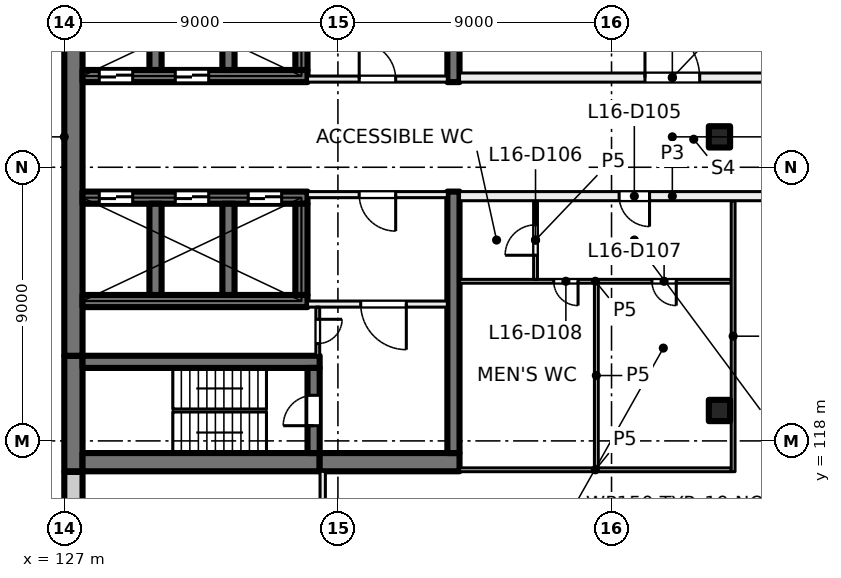
"""IFC4 building model, lengths in metres.
Left out: names, types, materials, properties, quantities, classifications, styles, units other than length and angle.
Written with IfcOpenShell. Run it as: python <this file> out.ifc"""

import sys

from ifc_helpers import new_model, si_unit, direction, frame, frame_2d, origin, origin_2d, place, context, subcontext, project, spatial, rectangle, extrude, element, fill, save


model = new_model("IFC4")
c1 = context("Model", 3, precision=1e-05, world=origin(), true_north=direction((0.0, 1.0)))
c2 = subcontext(c1, "Body", "Model", "MODEL_VIEW")
j1 = project(units=[si_unit("LENGTHUNIT", "METRE"), si_unit("PLANEANGLEUNIT", "RADIAN")], contexts=[c1])
p1 = place(None, origin())
s1 = spatial("IfcSite", under=j1, at=p1, CompositionType="ELEMENT")
p2 = place(p1, origin())
s2 = spatial("IfcBuilding", under=s1, at=p2, CompositionType="ELEMENT")
p3 = place(p2, frame((0.0, 0.0, 71.5)))
s3 = spatial("IfcBuildingStorey", under=s2, at=p3, CompositionType="ELEMENT", Elevation=71.5)
for number, where, z_axis, x_axis in (
    (1, (148.55, 119.0, 0.0), (0.0, 0.0, 1.0), (1.0, 0.0, 0.0)),
    (2, (148.55, 128.0, 0.0), (0.0, 0.0, 1.0), (1.0, 0.0, 0.0)),
):
    element("IfcColumn", number, at=place(p3, frame(where, z_axis=z_axis, x_axis=x_axis)), inside=s3, PredefinedType="COLUMN", context=c2, shape_type="SweptSolid", body=[
        extrude(rectangle(XDim=0.7, YDim=0.7, at=origin_2d()), origin(), (0.0, 0.0, 1.0), 4.0),
    ])
p4 = place(p3, frame((127.3, 117.0, 0.0), z_axis=(0.0, 0.0, 1.0), x_axis=(0.0, 1.0, 0.0)))
e3 = element("IfcWall", 3, at=p4, inside=s3, PredefinedType="SHEAR", context=c2, shape_type="SweptSolid", body=[
    extrude(rectangle(XDim=3.8, YDim=0.6, at=frame_2d((1.9, 0.0))), origin(), (0.0, 0.0, 1.0), 4.0),
])
p5 = place(p3, frame((127.3, 120.8, 0.0), z_axis=(0.0, 0.0, 1.0), x_axis=(0.0, 1.0, 0.0)))
e4 = element("IfcWall", 4, at=p5, inside=s3, PredefinedType="SHEAR", context=c2, shape_type="SweptSolid", body=[
    extrude(rectangle(XDim=14.4, YDim=0.6, at=frame_2d((7.2, 0.0))), origin(), (0.0, 0.0, 1.0), 4.0),
])
p6 = place(p3, frame((127.6, 117.3, 0.0), z_axis=(0.0, 0.0, 1.0), x_axis=(1.0, 0.0, 0.0)))
e5 = element("IfcWall", 5, at=p6, inside=s3, PredefinedType="SHEAR", context=c2, shape_type="SweptSolid", body=[
    extrude(rectangle(XDim=7.8, YDim=0.6, at=frame_2d((3.9, 0.0))), origin(), (0.0, 0.0, 1.0), 4.0),
])
p7 = place(p3, frame((135.4, 117.3, 0.0), z_axis=(0.0, 0.0, 1.0), x_axis=(1.0, 0.0, 0.0)))
e6 = element("IfcWall", 6, at=p7, inside=s3, PredefinedType="SHEAR", context=c2, shape_type="SweptSolid", body=[
    extrude(rectangle(XDim=4.6, YDim=0.6, at=frame_2d((2.3, 0.0))), origin(), (0.0, 0.0, 1.0), 4.0),
])
p8 = place(p3, frame((127.6, 120.6, 0.0), z_axis=(0.0, 0.0, 1.0), x_axis=(1.0, 0.0, 0.0)))
e7 = element("IfcWall", 7, at=p8, inside=s3, PredefinedType="SHEAR", context=c2, shape_type="SweptSolid", body=[
    extrude(rectangle(XDim=7.8, YDim=0.4, at=frame_2d((3.9, 0.0))), origin(), (0.0, 0.0, 1.0), 4.0),
])
p9 = place(p3, frame((135.2, 117.6, 0.0), z_axis=(0.0, 0.0, 1.0), x_axis=(0.0, 1.0, 0.0)))
e8 = element("IfcWall", 8, at=p9, inside=s3, PredefinedType="SHEAR", context=c2, shape_type="SweptSolid", body=[
    extrude(rectangle(XDim=2.8, YDim=0.4, at=frame_2d((1.4, 0.0))), origin(), (0.0, 0.0, 1.0), 4.0),
])
p10 = place(p9, frame((0.9, 0.0, 0.0)))
e9 = element("IfcOpeningElement", 9, at=p10, cuts=e8, PredefinedType="OPENING", context=c2, shape_type="SweptSolid", body=[
    extrude(rectangle(XDim=1.0, YDim=2.1, at=frame_2d((0.5, 1.05))), frame((0.0, 0.21, 0.0), z_axis=(0.0, -1.0, 0.0), x_axis=(1.0, 0.0, 0.0)), (0.0, 0.0, 1.0), 0.42),
])
p11 = place(p3, frame((127.6, 126.0, 0.0), z_axis=(0.0, 0.0, 1.0), x_axis=(1.0, 0.0, 0.0)))
e10 = element("IfcWall", 10, at=p11, inside=s3, PredefinedType="SHEAR", context=c2, shape_type="SweptSolid", body=[
    extrude(rectangle(XDim=7.4, YDim=0.4, at=frame_2d((3.7, 0.0))), origin(), (0.0, 0.0, 1.0), 4.0),
])
p12 = place(p11, frame((0.55, 0.0, 0.0)))
e11 = element("IfcOpeningElement", 11, at=p12, cuts=e10, PredefinedType="OPENING", context=c2, shape_type="SweptSolid", body=[
    extrude(rectangle(XDim=1.1, YDim=2.1, at=frame_2d((0.55, 1.05))), frame((0.0, 0.21, 0.0), z_axis=(0.0, -1.0, 0.0), x_axis=(1.0, 0.0, 0.0)), (0.0, 0.0, 1.0), 0.42),
])
p13 = place(p11, frame((3.05, 0.0, 0.0)))
e12 = element("IfcOpeningElement", 12, at=p13, cuts=e10, PredefinedType="OPENING", context=c2, shape_type="SweptSolid", body=[
    extrude(rectangle(XDim=1.1, YDim=2.1, at=frame_2d((0.55, 1.05))), frame((0.0, 0.21, 0.0), z_axis=(0.0, -1.0, 0.0), x_axis=(1.0, 0.0, 0.0)), (0.0, 0.0, 1.0), 0.42),
])
p14 = place(p11, frame((5.45, 0.0, 0.0)))
e13 = element("IfcOpeningElement", 13, at=p14, cuts=e10, PredefinedType="OPENING", context=c2, shape_type="SweptSolid", body=[
    extrude(rectangle(XDim=1.1, YDim=2.1, at=frame_2d((0.55, 1.05))), frame((0.0, 0.21, 0.0), z_axis=(0.0, -1.0, 0.0), x_axis=(1.0, 0.0, 0.0)), (0.0, 0.0, 1.0), 0.42),
])
p15 = place(p3, frame((127.6, 122.6, 0.0), z_axis=(0.0, 0.0, 1.0), x_axis=(1.0, 0.0, 0.0)))
e14 = element("IfcWall", 14, at=p15, inside=s3, PredefinedType="SHEAR", context=c2, shape_type="SweptSolid", body=[
    extrude(rectangle(XDim=7.4, YDim=0.4, at=frame_2d((3.7, 0.0))), origin(), (0.0, 0.0, 1.0), 4.0),
])
for number, where, z_axis, x_axis in (
    (15, (130.0, 122.8, 0.0), (0.0, 0.0, 1.0), (0.0, 1.0, 0.0)),
    (16, (132.4, 122.8, 0.0), (0.0, 0.0, 1.0), (0.0, 1.0, 0.0)),
    (17, (134.8, 122.8, 0.0), (0.0, 0.0, 1.0), (0.0, 1.0, 0.0)),
):
    element("IfcWall", number, at=place(p3, frame(where, z_axis=z_axis, x_axis=x_axis)), inside=s3, PredefinedType="SHEAR", context=c2, shape_type="SweptSolid", body=[
        extrude(rectangle(XDim=3.0, YDim=0.4, at=frame_2d((1.5, 0.0))), origin(), (0.0, 0.0, 1.0), 4.0),
    ])
p16 = place(p3, frame((127.6, 130.0, 0.0), z_axis=(0.0, 0.0, 1.0), x_axis=(1.0, 0.0, 0.0)))
e18 = element("IfcWall", 18, at=p16, inside=s3, PredefinedType="SHEAR", context=c2, shape_type="SweptSolid", body=[
    extrude(rectangle(XDim=7.4, YDim=0.4, at=frame_2d((3.7, 0.0))), origin(), (0.0, 0.0, 1.0), 4.0),
])
p17 = place(p16, frame((0.55, 0.0, 0.0)))
e19 = element("IfcOpeningElement", 19, at=p17, cuts=e18, PredefinedType="OPENING", context=c2, shape_type="SweptSolid", body=[
    extrude(rectangle(XDim=1.1, YDim=2.1, at=frame_2d((0.55, 1.05))), frame((0.0, 0.21, 0.0), z_axis=(0.0, -1.0, 0.0), x_axis=(1.0, 0.0, 0.0)), (0.0, 0.0, 1.0), 0.42),
])
p18 = place(p16, frame((3.05, 0.0, 0.0)))
e20 = element("IfcOpeningElement", 20, at=p18, cuts=e18, PredefinedType="OPENING", context=c2, shape_type="SweptSolid", body=[
    extrude(rectangle(XDim=1.1, YDim=2.1, at=frame_2d((0.55, 1.05))), frame((0.0, 0.21, 0.0), z_axis=(0.0, -1.0, 0.0), x_axis=(1.0, 0.0, 0.0)), (0.0, 0.0, 1.0), 0.42),
])
for number, where, z_axis, x_axis in (
    (21, (130.0, 130.2, 0.0), (0.0, 0.0, 1.0), (0.0, 1.0, 0.0)),
    (22, (132.4, 130.2, 0.0), (0.0, 0.0, 1.0), (0.0, 1.0, 0.0)),
):
    element("IfcWall", number, at=place(p3, frame(where, z_axis=z_axis, x_axis=x_axis)), inside=s3, PredefinedType="SHEAR", context=c2, shape_type="SweptSolid", body=[
        extrude(rectangle(XDim=3.0, YDim=0.4, at=frame_2d((1.5, 0.0))), origin(), (0.0, 0.0, 1.0), 4.0),
    ])
p19 = place(p3, frame((134.8, 130.2, 0.0), z_axis=(0.0, 0.0, 1.0), x_axis=(0.0, 1.0, 0.0)))
e23 = element("IfcWall", 23, at=p19, inside=s3, PredefinedType="SHEAR", context=c2, shape_type="SweptSolid", body=[
    extrude(rectangle(XDim=3.0, YDim=0.4, at=frame_2d((1.5, 0.0))), origin(), (0.0, 0.0, 1.0), 4.0),
])
p20 = place(p19, frame((0.95, 0.0, 0.0)))
e24 = element("IfcOpeningElement", 24, at=p20, cuts=e23, PredefinedType="OPENING", context=c2, shape_type="SweptSolid", body=[
    extrude(rectangle(XDim=1.1, YDim=2.1, at=frame_2d((0.55, 1.05))), frame((0.0, 0.21, 0.0), z_axis=(0.0, -1.0, 0.0), x_axis=(1.0, 0.0, 0.0)), (0.0, 0.0, 1.0), 0.42),
])
for number, where, z_axis, x_axis in (
    (25, (139.8, 117.6, 0.0), (0.0, 0.0, 1.0), (0.0, 1.0, 0.0)),
    (26, (139.8, 129.8, 0.0), (0.0, 0.0, 1.0), (0.0, 1.0, 0.0)),
):
    element("IfcWall", number, at=place(p3, frame(where, z_axis=z_axis, x_axis=x_axis)), inside=s3, PredefinedType="SHEAR", context=c2, shape_type="SweptSolid", body=[
        extrude(rectangle(XDim=8.6, YDim=0.4, at=frame_2d((4.3, 0.0))), origin(), (0.0, 0.0, 1.0), 4.0),
    ])
p21 = place(p3, frame((127.3, 114.07, 0.0), z_axis=(0.0, 0.0, 1.0), x_axis=(0.0, 1.0, 0.0)))
e27 = element("IfcWall", 27, at=p21, inside=s3, PredefinedType="SOLIDWALL", context=c2, shape_type="SweptSolid", body=[
    extrude(rectangle(XDim=2.91, YDim=0.6, at=frame_2d((1.455, 0.0))), origin(), (0.0, 0.0, 1.0), 3.625),
])
p22 = place(p3, frame((135.0, 129.9, 0.0), z_axis=(0.0, 0.0, 1.0), x_axis=(1.0, 0.0, 0.0)))
e28 = element("IfcWall", 28, at=p22, inside=s3, PredefinedType="PARTITIONING", context=c2, shape_type="SweptSolid", body=[
    extrude(rectangle(XDim=4.6, YDim=0.2, at=frame_2d((2.3, 0.0))), origin(), (0.0, 0.0, 1.0), 3.625),
])
p23 = place(p22, frame((1.7, 0.0, 0.0)))
e29 = element("IfcOpeningElement", 29, at=p23, cuts=e28, PredefinedType="OPENING", context=c2, shape_type="SweptSolid", body=[
    extrude(rectangle(XDim=1.2, YDim=2.1, at=frame_2d((0.6, 1.05))), frame((0.0, 0.11, 0.0), z_axis=(0.0, -1.0, 0.0), x_axis=(1.0, 0.0, 0.0)), (0.0, 0.0, 1.0), 0.22),
])
p24 = place(p3, frame((139.6, 126.1, 0.0), z_axis=(0.0, 0.0, 1.0), x_axis=(-1.0, 0.0, 0.0)))
e30 = element("IfcWall", 30, at=p24, inside=s3, PredefinedType="PARTITIONING", context=c2, shape_type="SweptSolid", body=[
    extrude(rectangle(XDim=4.6, YDim=0.2, at=frame_2d((2.3, 0.0))), origin(), (0.0, 0.0, 1.0), 3.625),
])
p25 = place(p24, frame((1.7, 0.0, 0.0)))
e31 = element("IfcOpeningElement", 31, at=p25, cuts=e30, PredefinedType="OPENING", context=c2, shape_type="SweptSolid", body=[
    extrude(rectangle(XDim=1.2, YDim=2.1, at=frame_2d((0.6, 1.05))), frame((0.0, 0.11, 0.0), z_axis=(0.0, -1.0, 0.0), x_axis=(1.0, 0.0, 0.0)), (0.0, 0.0, 1.0), 0.22),
])
p26 = place(p3, frame((139.6, 122.5, 0.0), z_axis=(0.0, 0.0, 1.0), x_axis=(-1.0, 0.0, 0.0)))
e32 = element("IfcWall", 32, at=p26, inside=s3, PredefinedType="PARTITIONING", context=c2, shape_type="SweptSolid", body=[
    extrude(rectangle(XDim=4.6, YDim=0.2, at=frame_2d((2.3, 0.0))), origin(), (0.0, 0.0, 1.0), 3.625),
])
p27 = place(p26, frame((1.35, 0.0, 0.0)))
e33 = element("IfcOpeningElement", 33, at=p27, cuts=e32, PredefinedType="OPENING", context=c2, shape_type="SweptSolid", body=[
    extrude(rectangle(XDim=1.5, YDim=2.1, at=frame_2d((0.75, 1.05))), frame((0.0, 0.11, 0.0), z_axis=(0.0, -1.0, 0.0), x_axis=(1.0, 0.0, 0.0)), (0.0, 0.0, 1.0), 0.22),
])
p28 = place(p3, frame((135.337, 122.4, 0.0), z_axis=(0.0, 0.0, 1.0), x_axis=(0.0, -1.0, 0.0)))
e34 = element("IfcWall", 34, at=p28, inside=s3, PredefinedType="PARTITIONING", context=c2, shape_type="SweptSolid", body=[
    extrude(rectangle(XDim=1.6, YDim=0.125, at=frame_2d((0.8, 0.0))), origin(), (0.0, 0.0, 1.0), 3.625),
])
p29 = place(p28, frame((0.4, 0.0, 0.0)))
e35 = element("IfcOpeningElement", 35, at=p29, cuts=e34, PredefinedType="OPENING", context=c2, shape_type="SweptSolid", body=[
    extrude(rectangle(XDim=0.8, YDim=2.1, at=frame_2d((0.4, 1.05))), frame((0.0, 0.073, 0.0), z_axis=(0.0, -1.0, 0.0), x_axis=(1.0, 0.0, 0.0)), (0.0, 0.0, 1.0), 0.145),
])
p30 = place(p3, frame((135.5, 117.0, 0.0), z_axis=(0.0, 0.0, 1.0), x_axis=(0.0, -1.0, 0.0)))
e36 = element("IfcWall", 36, at=p30, inside=s3, PredefinedType="PARTITIONING", context=c2, shape_type="SweptSolid", body=[
    extrude(rectangle(XDim=6.4, YDim=0.175, at=frame_2d((3.2, 0.0))), origin(), (0.0, 0.0, 1.0), 3.625),
])
p31 = place(p30, frame((2.6, 0.0, 0.0)))
e37 = element("IfcOpeningElement", 37, at=p31, cuts=e36, PredefinedType="OPENING", context=c2, shape_type="SweptSolid", body=[
    extrude(rectangle(XDim=1.2, YDim=2.1, at=frame_2d((0.6, 1.05))), frame((0.0, 0.097, 0.0), z_axis=(0.0, -1.0, 0.0), x_axis=(1.0, 0.0, 0.0)), (0.0, 0.0, 1.0), 0.195),
])
p32 = place(p3, frame((140.0, 117.05, 0.0), z_axis=(0.0, 0.0, 1.0), x_axis=(1.0, 0.0, 0.0)))
e38 = element("IfcWall", 38, at=p32, inside=s3, PredefinedType="PARTITIONING", context=c2, shape_type="SweptSolid", body=[
    extrude(rectangle(XDim=8.938, YDim=0.125, at=frame_2d((4.469, 0.0))), origin(), (0.0, 0.0, 1.0), 3.625),
])
p33 = place(p3, frame((148.938, 123.25, 0.0), z_axis=(0.0, 0.0, 1.0), x_axis=(-1.0, 0.0, 0.0)))
e39 = element("IfcWall", 39, at=p33, inside=s3, PredefinedType="PARTITIONING", context=c2, shape_type="SweptSolid", body=[
    extrude(rectangle(XDim=8.938, YDim=0.125, at=frame_2d((4.469, 0.0))), origin(), (0.0, 0.0, 1.0), 3.625),
])
p34 = place(p33, frame((1.809, 0.0, 0.0)))
e40 = element("IfcOpeningElement", 40, at=p34, cuts=e39, PredefinedType="OPENING", context=c2, shape_type="SweptSolid", body=[
    extrude(rectangle(XDim=0.8, YDim=2.1, at=frame_2d((0.4, 1.05))), frame((0.0, 0.073, 0.0), z_axis=(0.0, -1.0, 0.0), x_axis=(1.0, 0.0, 0.0)), (0.0, 0.0, 1.0), 0.145),
])
p35 = place(p33, frame((5.04, 0.0, 0.0)))
e41 = element("IfcOpeningElement", 41, at=p35, cuts=e39, PredefinedType="OPENING", context=c2, shape_type="SweptSolid", body=[
    extrude(rectangle(XDim=0.8, YDim=2.1, at=frame_2d((0.4, 1.05))), frame((0.0, 0.073, 0.0), z_axis=(0.0, -1.0, 0.0), x_axis=(1.0, 0.0, 0.0)), (0.0, 0.0, 1.0), 0.145),
])
p36 = place(p3, frame((140.0, 129.95, 0.0), z_axis=(0.0, 0.0, 1.0), x_axis=(1.0, 0.0, 0.0)))
e42 = element("IfcWall", 42, at=p36, inside=s3, PredefinedType="PARTITIONING", context=c2, shape_type="SweptSolid", body=[
    extrude(rectangle(XDim=14.0, YDim=0.3, at=frame_2d((7.0, 0.0))), origin(), (0.0, 0.0, 1.0), 3.625),
])
p37 = place(p36, frame((6.1, 0.0, 0.0)))
e43 = element("IfcOpeningElement", 43, at=p37, cuts=e42, PredefinedType="OPENING", context=c2, shape_type="SweptSolid", body=[
    extrude(rectangle(XDim=1.8, YDim=2.1, at=frame_2d((0.9, 1.05))), frame((0.0, 0.16, 0.0), z_axis=(0.0, -1.0, 0.0), x_axis=(1.0, 0.0, 0.0)), (0.0, 0.0, 1.0), 0.32),
])
p38 = place(p3, frame((142.5, 123.312, 0.0), z_axis=(0.0, 0.0, 1.0), x_axis=(0.0, 1.0, 0.0)))
e44 = element("IfcWall", 44, at=p38, inside=s3, PredefinedType="PARTITIONING", context=c2, shape_type="SweptSolid", body=[
    extrude(rectangle(XDim=2.588, YDim=0.125, at=frame_2d((1.294, 0.0))), origin(), (0.0, 0.0, 1.0), 3.625),
])
p39 = place(p38, frame((0.794, 0.0, 0.0)))
e45 = element("IfcOpeningElement", 45, at=p39, cuts=e44, PredefinedType="OPENING", context=c2, shape_type="SweptSolid", body=[
    extrude(rectangle(XDim=1.0, YDim=2.1, at=frame_2d((0.5, 1.05))), frame((0.0, 0.073, 0.0), z_axis=(0.0, -1.0, 0.0), x_axis=(1.0, 0.0, 0.0)), (0.0, 0.0, 1.0), 0.145),
])
p40 = place(p3, frame((144.5, 123.188, 0.0), z_axis=(0.0, 0.0, 1.0), x_axis=(0.0, -1.0, 0.0)))
e46 = element("IfcWall", 46, at=p40, inside=s3, PredefinedType="PARTITIONING", context=c2, shape_type="SweptSolid", body=[
    extrude(rectangle(XDim=6.076, YDim=0.125, at=frame_2d((3.038, 0.0))), origin(), (0.0, 0.0, 1.0), 3.625),
])
p41 = place(p3, frame((149.0, 116.988, 0.0), z_axis=(0.0, 0.0, 1.0), x_axis=(0.0, 1.0, 0.0)))
e47 = element("IfcWall", 47, at=p41, inside=s3, PredefinedType="PARTITIONING", context=c2, shape_type="SweptSolid", body=[
    extrude(rectangle(XDim=8.912, YDim=0.125, at=frame_2d((4.456, 0.0))), origin(), (0.0, 0.0, 1.0), 3.625),
])
p42 = place(p3, frame((154.0, 126.05, 0.0), z_axis=(0.0, 0.0, 1.0), x_axis=(-1.0, 0.0, 0.0)))
e48 = element("IfcWall", 48, at=p42, inside=s3, PredefinedType="PARTITIONING", context=c2, shape_type="SweptSolid", body=[
    extrude(rectangle(XDim=14.0, YDim=0.3, at=frame_2d((7.0, 0.0))), origin(), (0.0, 0.0, 1.0), 3.625),
])
p43 = place(p42, frame((7.75, 0.0, 0.0)))
e49 = element("IfcOpeningElement", 49, at=p43, cuts=e48, PredefinedType="OPENING", context=c2, shape_type="SweptSolid", body=[
    extrude(rectangle(XDim=1.0, YDim=2.1, at=frame_2d((0.5, 1.05))), frame((0.0, 0.16, 0.0), z_axis=(0.0, -1.0, 0.0), x_axis=(1.0, 0.0, 0.0)), (0.0, 0.0, 1.0), 0.32),
])
p44 = place(p42, frame((1.6, 0.0, 0.0)))
e50 = element("IfcOpeningElement", 50, at=p44, cuts=e48, PredefinedType="OPENING", context=c2, shape_type="SweptSolid", body=[
    extrude(rectangle(XDim=1.8, YDim=2.1, at=frame_2d((0.9, 1.05))), frame((0.0, 0.16, 0.0), z_axis=(0.0, -1.0, 0.0), x_axis=(1.0, 0.0, 0.0)), (0.0, 0.0, 1.0), 0.32),
])
p45 = place(p17, origin())
e51 = element("IfcDoor", 51, at=p45, inside=s3, OperationType="DOUBLE_DOOR_SLIDING", PredefinedType="DOOR", context=c2, shape_type="SweptSolid", body=[
    extrude(rectangle(XDim=1.1, YDim=2.1, at=frame_2d((0.55, 1.05))), frame((0.0, 0.025, 0.0), z_axis=(0.0, -1.0, 0.0), x_axis=(1.0, 0.0, 0.0)), (0.0, 0.0, 1.0), 0.05),
])
fill(e19, e51)
p46 = place(p18, origin())
e52 = element("IfcDoor", 52, at=p46, inside=s3, OperationType="DOUBLE_DOOR_SLIDING", PredefinedType="DOOR", context=c2, shape_type="SweptSolid", body=[
    extrude(rectangle(XDim=1.1, YDim=2.1, at=frame_2d((0.55, 1.05))), frame((0.0, 0.025, 0.0), z_axis=(0.0, -1.0, 0.0), x_axis=(1.0, 0.0, 0.0)), (0.0, 0.0, 1.0), 0.05),
])
fill(e20, e52)
p47 = place(p12, origin())
e53 = element("IfcDoor", 53, at=p47, inside=s3, OperationType="DOUBLE_DOOR_SLIDING", PredefinedType="DOOR", context=c2, shape_type="SweptSolid", body=[
    extrude(rectangle(XDim=1.1, YDim=2.1, at=frame_2d((0.55, 1.05))), frame((0.0, 0.025, 0.0), z_axis=(0.0, -1.0, 0.0), x_axis=(1.0, 0.0, 0.0)), (0.0, 0.0, 1.0), 0.05),
])
fill(e11, e53)
p48 = place(p13, origin())
e54 = element("IfcDoor", 54, at=p48, inside=s3, OperationType="DOUBLE_DOOR_SLIDING", PredefinedType="DOOR", context=c2, shape_type="SweptSolid", body=[
    extrude(rectangle(XDim=1.1, YDim=2.1, at=frame_2d((0.55, 1.05))), frame((0.0, 0.025, 0.0), z_axis=(0.0, -1.0, 0.0), x_axis=(1.0, 0.0, 0.0)), (0.0, 0.0, 1.0), 0.05),
])
fill(e12, e54)
p49 = place(p14, origin())
e55 = element("IfcDoor", 55, at=p49, inside=s3, OperationType="DOUBLE_DOOR_SLIDING", PredefinedType="DOOR", context=c2, shape_type="SweptSolid", body=[
    extrude(rectangle(XDim=1.1, YDim=2.1, at=frame_2d((0.55, 1.05))), frame((0.0, 0.025, 0.0), z_axis=(0.0, -1.0, 0.0), x_axis=(1.0, 0.0, 0.0)), (0.0, 0.0, 1.0), 0.05),
])
fill(e13, e55)
p50 = place(p23, origin())
e56 = element("IfcDoor", 56, at=p50, inside=s3, OperationType="DOUBLE_DOOR_SINGLE_SWING", PredefinedType="DOOR", context=c2, shape_type="SweptSolid", body=[
    extrude(rectangle(XDim=1.2, YDim=2.1, at=frame_2d((0.6, 1.05))), frame((0.0, 0.025, 0.0), z_axis=(0.0, -1.0, 0.0), x_axis=(1.0, 0.0, 0.0)), (0.0, 0.0, 1.0), 0.05),
])
fill(e29, e56)
p51 = place(p25, origin())
e57 = element("IfcDoor", 57, at=p51, inside=s3, OperationType="DOUBLE_DOOR_SINGLE_SWING", PredefinedType="DOOR", context=c2, shape_type="SweptSolid", body=[
    extrude(rectangle(XDim=1.2, YDim=2.1, at=frame_2d((0.6, 1.05))), frame((0.0, 0.025, 0.0), z_axis=(0.0, -1.0, 0.0), x_axis=(1.0, 0.0, 0.0)), (0.0, 0.0, 1.0), 0.05),
])
fill(e31, e57)
p52 = place(p27, origin())
e58 = element("IfcDoor", 58, at=p52, inside=s3, OperationType="DOUBLE_DOOR_SINGLE_SWING", PredefinedType="DOOR", context=c2, shape_type="SweptSolid", body=[
    extrude(rectangle(XDim=1.5, YDim=2.1, at=frame_2d((0.75, 1.05))), frame((0.0, 0.025, 0.0), z_axis=(0.0, -1.0, 0.0), x_axis=(1.0, 0.0, 0.0)), (0.0, 0.0, 1.0), 0.05),
])
fill(e33, e58)
p53 = place(p10, origin())
e59 = element("IfcDoor", 59, at=p53, inside=s3, OperationType="SINGLE_SWING_RIGHT", PredefinedType="DOOR", context=c2, shape_type="SweptSolid", body=[
    extrude(rectangle(XDim=1.0, YDim=2.1, at=frame_2d((0.5, 1.05))), frame((0.0, 0.025, 0.0), z_axis=(0.0, -1.0, 0.0), x_axis=(1.0, 0.0, 0.0)), (0.0, 0.0, 1.0), 0.05),
])
fill(e9, e59)
p54 = place(p29, origin())
e60 = element("IfcDoor", 60, at=p54, inside=s3, OperationType="SINGLE_SWING_LEFT", PredefinedType="DOOR", context=c2, shape_type="SweptSolid", body=[
    extrude(rectangle(XDim=0.8, YDim=2.1, at=frame_2d((0.4, 1.05))), frame((0.0, 0.025, 0.0), z_axis=(0.0, -1.0, 0.0), x_axis=(1.0, 0.0, 0.0)), (0.0, 0.0, 1.0), 0.05),
])
fill(e35, e60)
p55 = place(p37, origin())
e61 = element("IfcDoor", 61, at=p55, inside=s3, OperationType="DOUBLE_DOOR_SINGLE_SWING", PredefinedType="DOOR", context=c2, shape_type="SweptSolid", body=[
    extrude(rectangle(XDim=1.8, YDim=2.1, at=frame_2d((0.9, 1.05))), frame((0.0, 0.025, 0.0), z_axis=(0.0, -1.0, 0.0), x_axis=(1.0, 0.0, 0.0)), (0.0, 0.0, 1.0), 0.05),
])
fill(e43, e61)
p56 = place(p43, origin())
e62 = element("IfcDoor", 62, at=p56, inside=s3, OperationType="SINGLE_SWING_RIGHT", PredefinedType="DOOR", context=c2, shape_type="SweptSolid", body=[
    extrude(rectangle(XDim=1.0, YDim=2.1, at=frame_2d((0.5, 1.05))), frame((0.0, 0.025, 0.0), z_axis=(0.0, -1.0, 0.0), x_axis=(1.0, 0.0, 0.0)), (0.0, 0.0, 1.0), 0.05),
])
fill(e49, e62)
p57 = place(p39, origin())
e63 = element("IfcDoor", 63, at=p57, inside=s3, OperationType="SINGLE_SWING_RIGHT", PredefinedType="DOOR", context=c2, shape_type="SweptSolid", body=[
    extrude(rectangle(XDim=1.0, YDim=2.1, at=frame_2d((0.5, 1.05))), frame((0.0, 0.025, 0.0), z_axis=(0.0, -1.0, 0.0), x_axis=(1.0, 0.0, 0.0)), (0.0, 0.0, 1.0), 0.05),
])
fill(e45, e63)
p58 = place(p34, origin())
e64 = element("IfcDoor", 64, at=p58, inside=s3, OperationType="SINGLE_SWING_LEFT", PredefinedType="DOOR", context=c2, shape_type="SweptSolid", body=[
    extrude(rectangle(XDim=0.8, YDim=2.1, at=frame_2d((0.4, 1.05))), frame((0.0, 0.025, 0.0), z_axis=(0.0, -1.0, 0.0), x_axis=(1.0, 0.0, 0.0)), (0.0, 0.0, 1.0), 0.05),
])
fill(e40, e64)
p59 = place(p35, origin())
e65 = element("IfcDoor", 65, at=p59, inside=s3, OperationType="SINGLE_SWING_LEFT", PredefinedType="DOOR", context=c2, shape_type="SweptSolid", body=[
    extrude(rectangle(XDim=0.8, YDim=2.1, at=frame_2d((0.4, 1.05))), frame((0.0, 0.025, 0.0), z_axis=(0.0, -1.0, 0.0), x_axis=(1.0, 0.0, 0.0)), (0.0, 0.0, 1.0), 0.05),
])
fill(e41, e65)
save(model, sys.argv[1])
